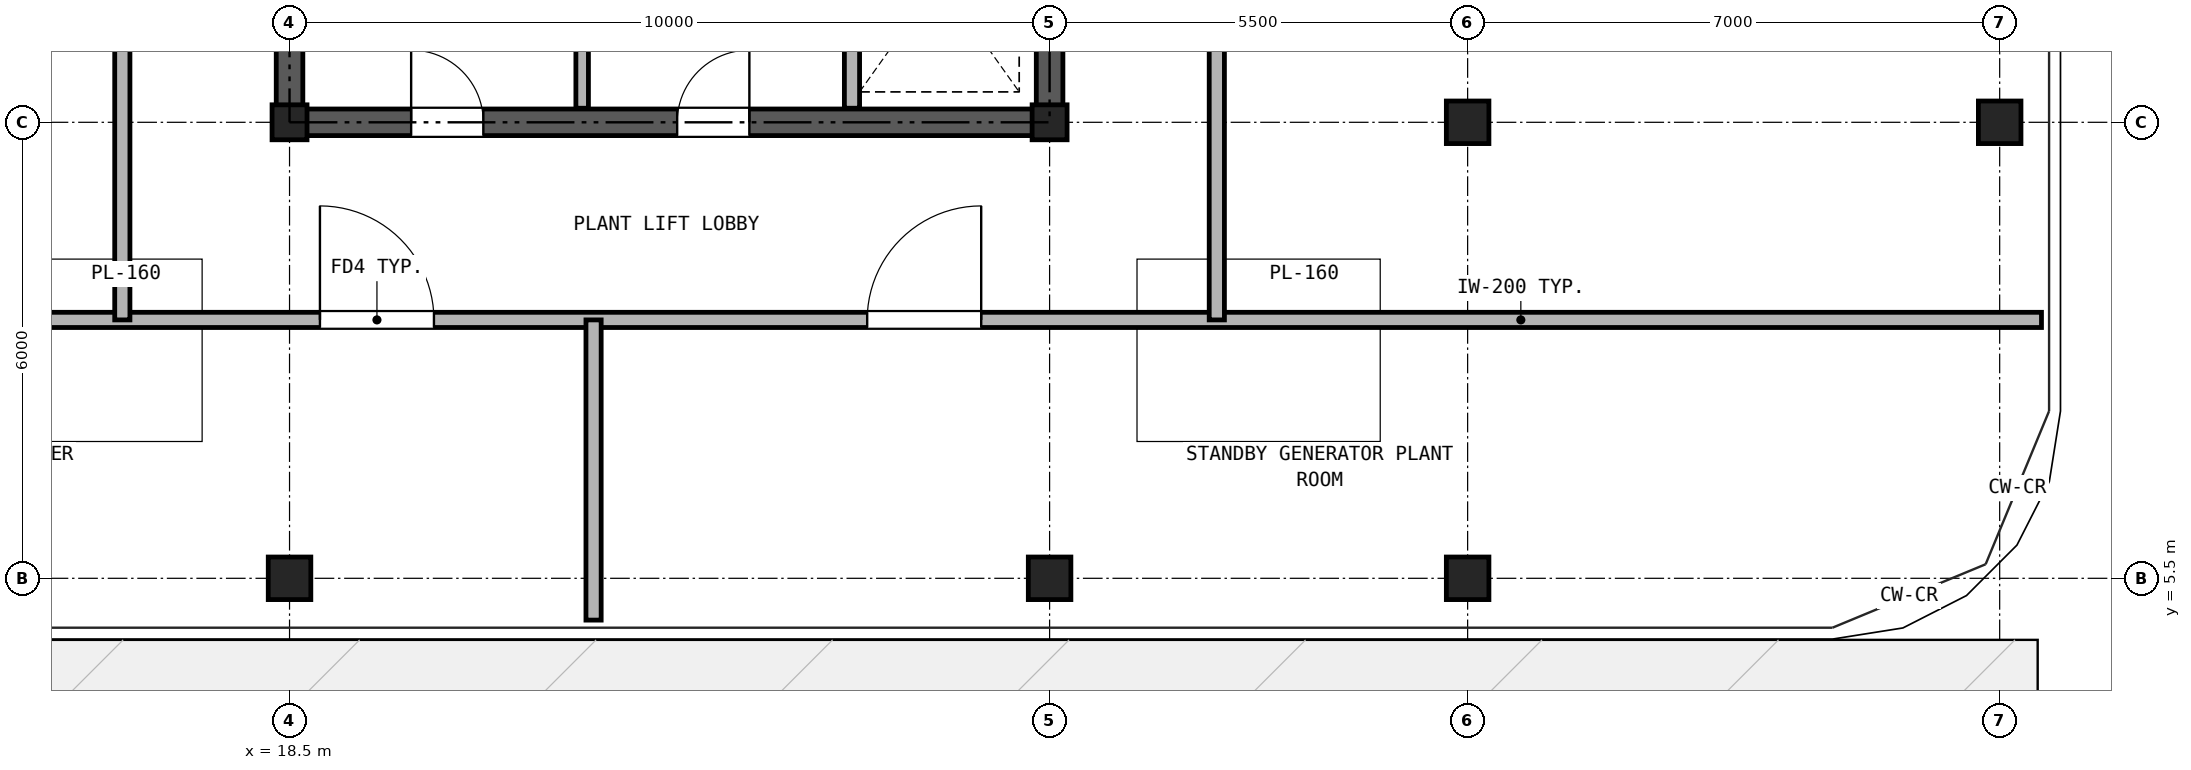
"""IFC4 building model, lengths in metres.
Left out: names, types, materials, properties, quantities, classifications, styles, units other than length and angle.
Written with IfcOpenShell. Run it as: python <this file> out.ifc"""

import sys

from ifc_helpers import new_model, si_unit, direction, frame, frame_2d, origin, origin_2d, place, context, subcontext, project, spatial, rectangle, hollow_rectangle, extrude, source, transform, mapped, element, fill, save


model = new_model("IFC4")
c1 = context("Model", 3, precision=1e-05, world=origin(), true_north=direction((0.0, 1.0)))
c2 = subcontext(c1, "Body", "Model", "MODEL_VIEW")
j1 = project(units=[si_unit("LENGTHUNIT", "METRE"), si_unit("PLANEANGLEUNIT", "RADIAN")], contexts=[c1])
p1 = place(None, origin())
s1 = spatial("IfcSite", under=j1, at=p1, CompositionType="ELEMENT")
p2 = place(p1, origin())
s2 = spatial("IfcBuilding", under=s1, at=p2, CompositionType="ELEMENT")
p3 = place(p2, frame((0.0, 0.0, 271.3)))
s3 = spatial("IfcBuildingStorey", under=s2, at=p3, CompositionType="ELEMENT", Elevation=271.3)
m1 = source(origin(), c2, "Body", "SweptSolid", [
    extrude(hollow_rectangle(XDim=0.56, YDim=0.56, WallThickness=0.03, at=origin_2d()), origin(), (0.0, 0.0, 1.0), 3.38),
])
for number, where, z_axis, x_axis in (
    (1, (18.5, 5.5, 0.0), (0.0, 0.0, 1.0), (1.0, 0.0, 0.0)),
    (2, (28.5, 5.5, 0.0), (0.0, 0.0, 1.0), (1.0, 0.0, 0.0)),
    (3, (34.0, 5.5, 0.0), (0.0, 0.0, 1.0), (1.0, 0.0, 0.0)),
    (4, (41.0, 11.5, 0.0), (0.0, 0.0, 1.0), (1.0, 0.0, 0.0)),
):
    element("IfcColumn", number, at=place(p3, frame(where, z_axis=z_axis, x_axis=x_axis)), inside=s3, PredefinedType="COLUMN", context=c2, shape_type="MappedRepresentation", body=[
        mapped(m1, transform((0.0, 0.0, 0.0), x_axis=(1.0, 0.0, 0.0), y_axis=(0.0, 1.0, 0.0), z_axis=(0.0, 0.0, 1.0), scale=1.0)),
    ])
m2 = source(origin(), c2, "Body", "SweptSolid", [
    extrude(hollow_rectangle(XDim=0.46, YDim=0.46, WallThickness=0.025, at=origin_2d()), origin(), (0.0, 0.0, 1.0), 3.38),
])
for number, where, z_axis, x_axis in (
    (5, (18.5, 11.5, 0.0), (0.0, 0.0, 1.0), (1.0, 0.0, 0.0)),
    (6, (28.5, 11.5, 0.0), (0.0, 0.0, 1.0), (1.0, 0.0, 0.0)),
):
    element("IfcColumn", number, at=place(p3, frame(where, z_axis=z_axis, x_axis=x_axis)), inside=s3, PredefinedType="COLUMN", context=c2, shape_type="MappedRepresentation", body=[
        mapped(m2, transform((0.0, 0.0, 0.0), x_axis=(1.0, 0.0, 0.0), y_axis=(0.0, 1.0, 0.0), z_axis=(0.0, 0.0, 1.0), scale=1.0)),
    ])
p4 = place(p3, frame((34.0, 11.5, 0.0), z_axis=(0.0, 0.0, 1.0), x_axis=(1.0, 0.0, 0.0)))
e7 = element("IfcColumn", 7, at=p4, inside=s3, PredefinedType="COLUMN", context=c2, shape_type="MappedRepresentation", body=[
    mapped(m1, transform((0.0, 0.0, 0.0), x_axis=(1.0, 0.0, 0.0), y_axis=(0.0, 1.0, 0.0), z_axis=(0.0, 0.0, 1.0), scale=1.0)),
])
p5 = place(p3, frame((18.325, 11.5, 0.0), z_axis=(0.0, 0.0, 1.0), x_axis=(1.0, 0.0, 0.0)))
e8 = element("IfcWall", 8, at=p5, inside=s3, PredefinedType="SHEAR", context=c2, shape_type="SweptSolid", body=[
    extrude(rectangle(XDim=10.35, YDim=0.35, at=frame_2d((5.175, 0.0))), origin(), (0.0, 0.0, 1.0), 3.38),
])
p6 = place(p5, frame((1.775, 0.0, 0.0)))
e9 = element("IfcOpeningElement", 9, at=p6, cuts=e8, PredefinedType="OPENING", context=c2, shape_type="SweptSolid", body=[
    extrude(rectangle(XDim=0.95, YDim=2.15, at=frame_2d((0.475, 1.075))), frame((0.0, 0.185, 0.0), z_axis=(0.0, -1.0, 0.0), x_axis=(1.0, 0.0, 0.0)), (0.0, 0.0, 1.0), 0.37),
])
p7 = place(p5, frame((5.275, 0.0, 0.0)))
e10 = element("IfcOpeningElement", 10, at=p7, cuts=e8, PredefinedType="OPENING", context=c2, shape_type="SweptSolid", body=[
    extrude(rectangle(XDim=0.95, YDim=2.15, at=frame_2d((0.475, 1.075))), frame((0.0, 0.185, 0.0), z_axis=(0.0, -1.0, 0.0), x_axis=(1.0, 0.0, 0.0)), (0.0, 0.0, 1.0), 0.37),
])
p8 = place(p3, frame((18.5, 11.675, 0.0), z_axis=(0.0, 0.0, 1.0), x_axis=(0.0, 1.0, 0.0)))
e11 = element("IfcWall", 11, at=p8, inside=s3, PredefinedType="SHEAR", context=c2, shape_type="SweptSolid", body=[
    extrude(rectangle(XDim=16.9, YDim=0.35, at=frame_2d((8.45, 0.0))), origin(), (0.0, 0.0, 1.0), 3.38),
])
p9 = place(p8, frame((7.475, 0.0, 0.0)))
e12 = element("IfcOpeningElement", 12, at=p9, cuts=e11, PredefinedType="OPENING", context=c2, shape_type="SweptSolid", body=[
    extrude(rectangle(XDim=1.15, YDim=2.2, at=frame_2d((0.575, 1.1))), frame((0.0, 0.185, 0.0), z_axis=(0.0, -1.0, 0.0), x_axis=(1.0, 0.0, 0.0)), (0.0, 0.0, 1.0), 0.37),
])
p10 = place(p3, frame((28.5, 11.675, 0.0), z_axis=(0.0, 0.0, 1.0), x_axis=(0.0, 1.0, 0.0)))
e13 = element("IfcWall", 13, at=p10, inside=s3, PredefinedType="SHEAR", context=c2, shape_type="SweptSolid", body=[
    extrude(rectangle(XDim=16.9, YDim=0.35, at=frame_2d((8.45, 0.0))), origin(), (0.0, 0.0, 1.0), 3.38),
])
p11 = place(p10, frame((7.475, 0.0, 0.0)))
e14 = element("IfcOpeningElement", 14, at=p11, cuts=e13, PredefinedType="OPENING", context=c2, shape_type="SweptSolid", body=[
    extrude(rectangle(XDim=1.15, YDim=2.2, at=frame_2d((0.575, 1.1))), frame((0.0, 0.185, 0.0), z_axis=(0.0, -1.0, 0.0), x_axis=(1.0, 0.0, 0.0)), (0.0, 0.0, 1.0), 0.37),
])
p12 = place(p3, frame((22.35, 11.685, 0.0), z_axis=(0.0, 0.0, 1.0), x_axis=(0.0, 1.0, 0.0)))
e15 = element("IfcWall", 15, at=p12, inside=s3, PredefinedType="PARTITIONING", context=c2, shape_type="SweptSolid", body=[
    extrude(rectangle(XDim=3.315, YDim=0.165, at=frame_2d((1.657, 0.0))), origin(), (0.0, 0.0, 1.0), 3.38),
])
p13 = place(p3, frame((25.9, 11.685, 0.0), z_axis=(0.0, 0.0, 1.0), x_axis=(0.0, 1.0, 0.0)))
e16 = element("IfcWall", 16, at=p13, inside=s3, PredefinedType="PARTITIONING", context=c2, shape_type="SweptSolid", body=[
    extrude(rectangle(XDim=3.315, YDim=0.2, at=frame_2d((1.657, 0.0))), origin(), (0.0, 0.0, 1.0), 3.38),
])
p14 = place(p3, frame((5.45, 8.9, 0.0), z_axis=(0.0, 0.0, 1.0), x_axis=(1.0, 0.0, 0.0)))
e17 = element("IfcWall", 17, at=p14, inside=s3, PredefinedType="PARTITIONING", context=c2, shape_type="SweptSolid", body=[
    extrude(rectangle(XDim=36.1, YDim=0.2, at=frame_2d((18.05, 0.0))), origin(), (0.0, 0.0, 1.0), 3.38),
])
p15 = place(p14, frame((13.45, 0.0, 0.0)))
e18 = element("IfcOpeningElement", 18, at=p15, cuts=e17, PredefinedType="OPENING", context=c2, shape_type="SweptSolid", body=[
    extrude(rectangle(XDim=1.5, YDim=2.25, at=frame_2d((0.75, 1.125))), frame((0.0, 0.11, 0.0), z_axis=(0.0, -1.0, 0.0), x_axis=(1.0, 0.0, 0.0)), (0.0, 0.0, 1.0), 0.22),
])
p16 = place(p14, frame((20.65, 0.0, 0.0)))
e19 = element("IfcOpeningElement", 19, at=p16, cuts=e17, PredefinedType="OPENING", context=c2, shape_type="SweptSolid", body=[
    extrude(rectangle(XDim=1.5, YDim=2.25, at=frame_2d((0.75, 1.125))), frame((0.0, 0.11, 0.0), z_axis=(0.0, -1.0, 0.0), x_axis=(1.0, 0.0, 0.0)), (0.0, 0.0, 1.0), 0.22),
])
p17 = place(p3, frame((16.3, 8.9, 0.0), z_axis=(0.0, 0.0, 1.0), x_axis=(0.0, 1.0, 0.0)))
e20 = element("IfcWall", 20, at=p17, inside=s3, PredefinedType="PARTITIONING", context=c2, shape_type="SweptSolid", body=[
    extrude(rectangle(XDim=19.85, YDim=0.2, at=frame_2d((9.925, 0.0))), origin(), (0.0, 0.0, 1.0), 3.38),
])
p18 = place(p17, frame((4.55, 0.0, 0.0)))
e21 = element("IfcOpeningElement", 21, at=p18, cuts=e20, PredefinedType="OPENING", context=c2, shape_type="SweptSolid", body=[
    extrude(rectangle(XDim=1.05, YDim=2.15, at=frame_2d((0.525, 1.075))), frame((0.0, 0.11, 0.0), z_axis=(0.0, -1.0, 0.0), x_axis=(1.0, 0.0, 0.0)), (0.0, 0.0, 1.0), 0.22),
])
p19 = place(p17, frame((14.475, 0.0, 0.0)))
e22 = element("IfcOpeningElement", 22, at=p19, cuts=e20, PredefinedType="OPENING", context=c2, shape_type="SweptSolid", body=[
    extrude(rectangle(XDim=1.05, YDim=2.15, at=frame_2d((0.525, 1.075))), frame((0.0, 0.11, 0.0), z_axis=(0.0, -1.0, 0.0), x_axis=(1.0, 0.0, 0.0)), (0.0, 0.0, 1.0), 0.22),
])
p20 = place(p3, frame((30.7, 8.9, 0.0), z_axis=(0.0, 0.0, 1.0), x_axis=(0.0, 1.0, 0.0)))
e23 = element("IfcWall", 23, at=p20, inside=s3, PredefinedType="PARTITIONING", context=c2, shape_type="SweptSolid", body=[
    extrude(rectangle(XDim=19.85, YDim=0.2, at=frame_2d((9.925, 0.0))), origin(), (0.0, 0.0, 1.0), 3.38),
])
p21 = place(p20, frame((9.425, 0.0, 0.0)))
e24 = element("IfcOpeningElement", 24, at=p21, cuts=e23, PredefinedType="OPENING", context=c2, shape_type="SweptSolid", body=[
    extrude(rectangle(XDim=1.05, YDim=2.15, at=frame_2d((0.525, 1.075))), frame((0.0, 0.11, 0.0), z_axis=(0.0, -1.0, 0.0), x_axis=(1.0, 0.0, 0.0)), (0.0, 0.0, 1.0), 0.22),
])
p22 = place(p3, frame((22.5, 4.95, 0.0), z_axis=(0.0, 0.0, 1.0), x_axis=(0.0, 1.0, 0.0)))
e25 = element("IfcWall", 25, at=p22, inside=s3, PredefinedType="PARTITIONING", context=c2, shape_type="SweptSolid", body=[
    extrude(rectangle(XDim=3.95, YDim=0.2, at=frame_2d((1.975, 0.0))), origin(), (0.0, 0.0, 1.0), 3.38),
])
p23 = place(p6, frame((0.95, 0.0, 0.0), z_axis=(0.0, 0.0, 1.0), x_axis=(-1.0, 0.0, 0.0)))
e26 = element("IfcDoor", 26, at=p23, inside=s3, OperationType="SINGLE_SWING_LEFT", PredefinedType="DOOR", context=c2, shape_type="SweptSolid", body=[
    extrude(rectangle(XDim=0.95, YDim=2.15, at=frame_2d((0.475, 1.075))), frame((0.0, 0.025, 0.0), z_axis=(0.0, -1.0, 0.0), x_axis=(1.0, 0.0, 0.0)), (0.0, 0.0, 1.0), 0.05),
])
fill(e9, e26)
p24 = place(p7, frame((0.95, 0.0, 0.0), z_axis=(0.0, 0.0, 1.0), x_axis=(-1.0, 0.0, 0.0)))
e27 = element("IfcDoor", 27, at=p24, inside=s3, OperationType="SINGLE_SWING_RIGHT", PredefinedType="DOOR", context=c2, shape_type="SweptSolid", body=[
    extrude(rectangle(XDim=0.95, YDim=2.15, at=frame_2d((0.475, 1.075))), frame((0.0, 0.025, 0.0), z_axis=(0.0, -1.0, 0.0), x_axis=(1.0, 0.0, 0.0)), (0.0, 0.0, 1.0), 0.05),
])
fill(e10, e27)
p25 = place(p15, frame((1.5, 0.0, 0.0), z_axis=(0.0, 0.0, 1.0), x_axis=(-1.0, 0.0, 0.0)))
e28 = element("IfcDoor", 28, at=p25, inside=s3, OperationType="SINGLE_SWING_LEFT", PredefinedType="DOOR", context=c2, shape_type="SweptSolid", body=[
    extrude(rectangle(XDim=1.5, YDim=2.25, at=frame_2d((0.75, 1.125))), frame((0.0, 0.025, 0.0), z_axis=(0.0, -1.0, 0.0), x_axis=(1.0, 0.0, 0.0)), (0.0, 0.0, 1.0), 0.05),
])
fill(e18, e28)
p26 = place(p16, frame((1.5, 0.0, 0.0), z_axis=(0.0, 0.0, 1.0), x_axis=(-1.0, 0.0, 0.0)))
e29 = element("IfcDoor", 29, at=p26, inside=s3, OperationType="SINGLE_SWING_RIGHT", PredefinedType="DOOR", context=c2, shape_type="SweptSolid", body=[
    extrude(rectangle(XDim=1.5, YDim=2.25, at=frame_2d((0.75, 1.125))), frame((0.0, 0.025, 0.0), z_axis=(0.0, -1.0, 0.0), x_axis=(1.0, 0.0, 0.0)), (0.0, 0.0, 1.0), 0.05),
])
fill(e19, e29)
save(model, sys.argv[1])
